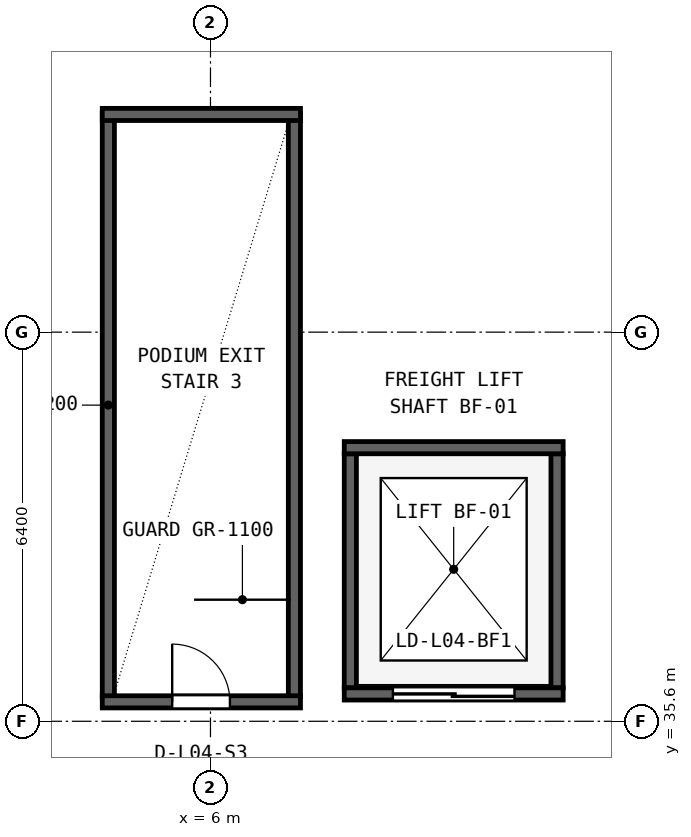
"""IFC4 building model, lengths in metres.
Left out: names, types, materials, properties, quantities, classifications, styles, units other than length and angle.
Written with IfcOpenShell. Run it as: python <this file> out.ifc"""

import sys

from ifc_helpers import new_model, si_unit, direction, frame, frame_2d, origin, place, context, subcontext, project, spatial, rectangle, extrude, source, transform, mapped, element, fill, save


model = new_model("IFC4")
c1 = context("Model", 3, precision=1e-05, world=origin(), true_north=direction((0.0, 1.0)))
c2 = subcontext(c1, "Body", "Model", "MODEL_VIEW")
j1 = project(units=[si_unit("LENGTHUNIT", "METRE"), si_unit("PLANEANGLEUNIT", "RADIAN")], contexts=[c1])
p1 = place(None, origin())
s1 = spatial("IfcSite", under=j1, at=p1, CompositionType="ELEMENT")
p2 = place(p1, origin())
s2 = spatial("IfcBuilding", under=s1, at=p2, CompositionType="ELEMENT")
p3 = place(p2, frame((0.0, 0.0, 22.2)))
s3 = spatial("IfcBuildingStorey", under=s2, at=p3, CompositionType="ELEMENT", Elevation=22.2)
for number, where, z_axis, x_axis in (
    (1, (4.32, 36.0, 0.0), (0.0, 0.0, 1.0), (0.0, 1.0, 0.0)),
    (2, (7.38, 36.0, 0.0), (0.0, 0.0, 1.0), (0.0, 1.0, 0.0)),
):
    element("IfcWall", number, at=place(p3, frame(where, z_axis=z_axis, x_axis=x_axis)), inside=s3, PredefinedType="SHEAR", context=c2, shape_type="SweptSolid", body=[
        extrude(rectangle(XDim=9.6, YDim=0.2, at=frame_2d((4.8, 0.0))), origin(), (0.0, 0.0, 1.0), 5.08),
    ])
p4 = place(p3, frame((4.22, 45.58, 0.0), z_axis=(0.0, 0.0, 1.0), x_axis=(1.0, 0.0, 0.0)))
e3 = element("IfcWall", 3, at=p4, inside=s3, PredefinedType="SHEAR", context=c2, shape_type="SweptSolid", body=[
    extrude(rectangle(XDim=3.26, YDim=0.2, at=frame_2d((1.63, 0.0))), origin(), (0.0, 0.0, 1.0), 5.08),
])
p5 = place(p3, frame((4.22, 35.92, 0.0), z_axis=(0.0, 0.0, 1.0), x_axis=(1.0, 0.0, 0.0)))
e4 = element("IfcWall", 4, at=p5, inside=s3, PredefinedType="SHEAR", context=c2, shape_type="SweptSolid", body=[
    extrude(rectangle(XDim=3.26, YDim=0.2, at=frame_2d((1.63, 0.0))), origin(), (0.0, 0.0, 1.0), 5.08),
])
p6 = place(p5, frame((1.15, 0.0, 0.0)))
e5 = element("IfcOpeningElement", 5, at=p6, cuts=e4, PredefinedType="OPENING", context=c2, shape_type="SweptSolid", body=[
    extrude(rectangle(XDim=0.95, YDim=2.1, at=frame_2d((0.475, 1.05))), frame((0.0, 0.11, 0.0), z_axis=(0.0, -1.0, 0.0), x_axis=(1.0, 0.0, 0.0)), (0.0, 0.0, 1.0), 0.22),
])
for number, where, z_axis, x_axis in (
    (6, (8.3, 36.15, 0.0), (0.0, 0.0, 1.0), (0.0, 1.0, 0.0)),
    (7, (11.7, 36.15, 0.0), (0.0, 0.0, 1.0), (0.0, 1.0, 0.0)),
):
    element("IfcWall", number, at=place(p3, frame(where, z_axis=z_axis, x_axis=x_axis)), inside=s3, PredefinedType="SHEAR", context=c2, shape_type="SweptSolid", body=[
        extrude(rectangle(XDim=3.85, YDim=0.2, at=frame_2d((1.925, 0.0))), origin(), (0.0, 0.0, 1.0), 5.08),
    ])
p7 = place(p3, frame((8.2, 40.1, 0.0), z_axis=(0.0, 0.0, 1.0), x_axis=(1.0, 0.0, 0.0)))
e8 = element("IfcWall", 8, at=p7, inside=s3, PredefinedType="SHEAR", context=c2, shape_type="SweptSolid", body=[
    extrude(rectangle(XDim=3.6, YDim=0.2, at=frame_2d((1.8, 0.0))), origin(), (0.0, 0.0, 1.0), 5.08),
])
p8 = place(p3, frame((8.2, 36.05, 0.0), z_axis=(0.0, 0.0, 1.0), x_axis=(1.0, 0.0, 0.0)))
e9 = element("IfcWall", 9, at=p8, inside=s3, PredefinedType="SHEAR", context=c2, shape_type="SweptSolid", body=[
    extrude(rectangle(XDim=3.6, YDim=0.2, at=frame_2d((1.8, 0.0))), origin(), (0.0, 0.0, 1.0), 5.08),
])
p9 = place(p8, frame((0.8, 0.0, 0.0)))
e10 = element("IfcOpeningElement", 10, at=p9, cuts=e9, PredefinedType="OPENING", context=c2, shape_type="SweptSolid", body=[
    extrude(rectangle(XDim=2.0, YDim=2.28, at=frame_2d((1.0, 1.14))), frame((0.0, 0.11, 0.0), z_axis=(0.0, -1.0, 0.0), x_axis=(1.0, 0.0, 0.0)), (0.0, 0.0, 1.0), 0.22),
])
m1 = source(origin(), c2, "Body", "SweptSolid", [
    extrude(rectangle(XDim=0.95, YDim=2.1, at=frame_2d((0.475, 1.05))), frame((0.0, 0.025, 0.0), z_axis=(0.0, -1.0, 0.0), x_axis=(1.0, 0.0, 0.0)), (0.0, 0.0, 1.0), 0.05),
])
p10 = place(p6, origin())
e11 = element("IfcDoor", 11, at=p10, inside=s3, OperationType="SINGLE_SWING_LEFT", PredefinedType="DOOR", context=c2, shape_type="MappedRepresentation", body=[
    mapped(m1, transform((0.0, 0.0, 0.0), x_axis=(1.0, 0.0, 0.0), y_axis=(0.0, 1.0, 0.0), z_axis=(0.0, 0.0, 1.0), scale=1.0)),
])
fill(e5, e11)
m2 = source(origin(), c2, "Body", "SweptSolid", [
    extrude(rectangle(XDim=2.0, YDim=2.28, at=frame_2d((1.0, 1.14))), frame((0.0, 0.025, 0.0), z_axis=(0.0, -1.0, 0.0), x_axis=(1.0, 0.0, 0.0)), (0.0, 0.0, 1.0), 0.05),
])
p11 = place(p9, frame((2.0, 0.0, 0.0), z_axis=(0.0, 0.0, 1.0), x_axis=(-1.0, 0.0, 0.0)))
e12 = element("IfcDoor", 12, at=p11, inside=s3, OperationType="DOUBLE_DOOR_SLIDING", PredefinedType="DOOR", context=c2, shape_type="MappedRepresentation", body=[
    mapped(m2, transform((0.0, 0.0, 0.0), x_axis=(1.0, 0.0, 0.0), y_axis=(0.0, 1.0, 0.0), z_axis=(0.0, 0.0, 1.0), scale=1.0)),
])
fill(e10, e12)
save(model, sys.argv[1])
